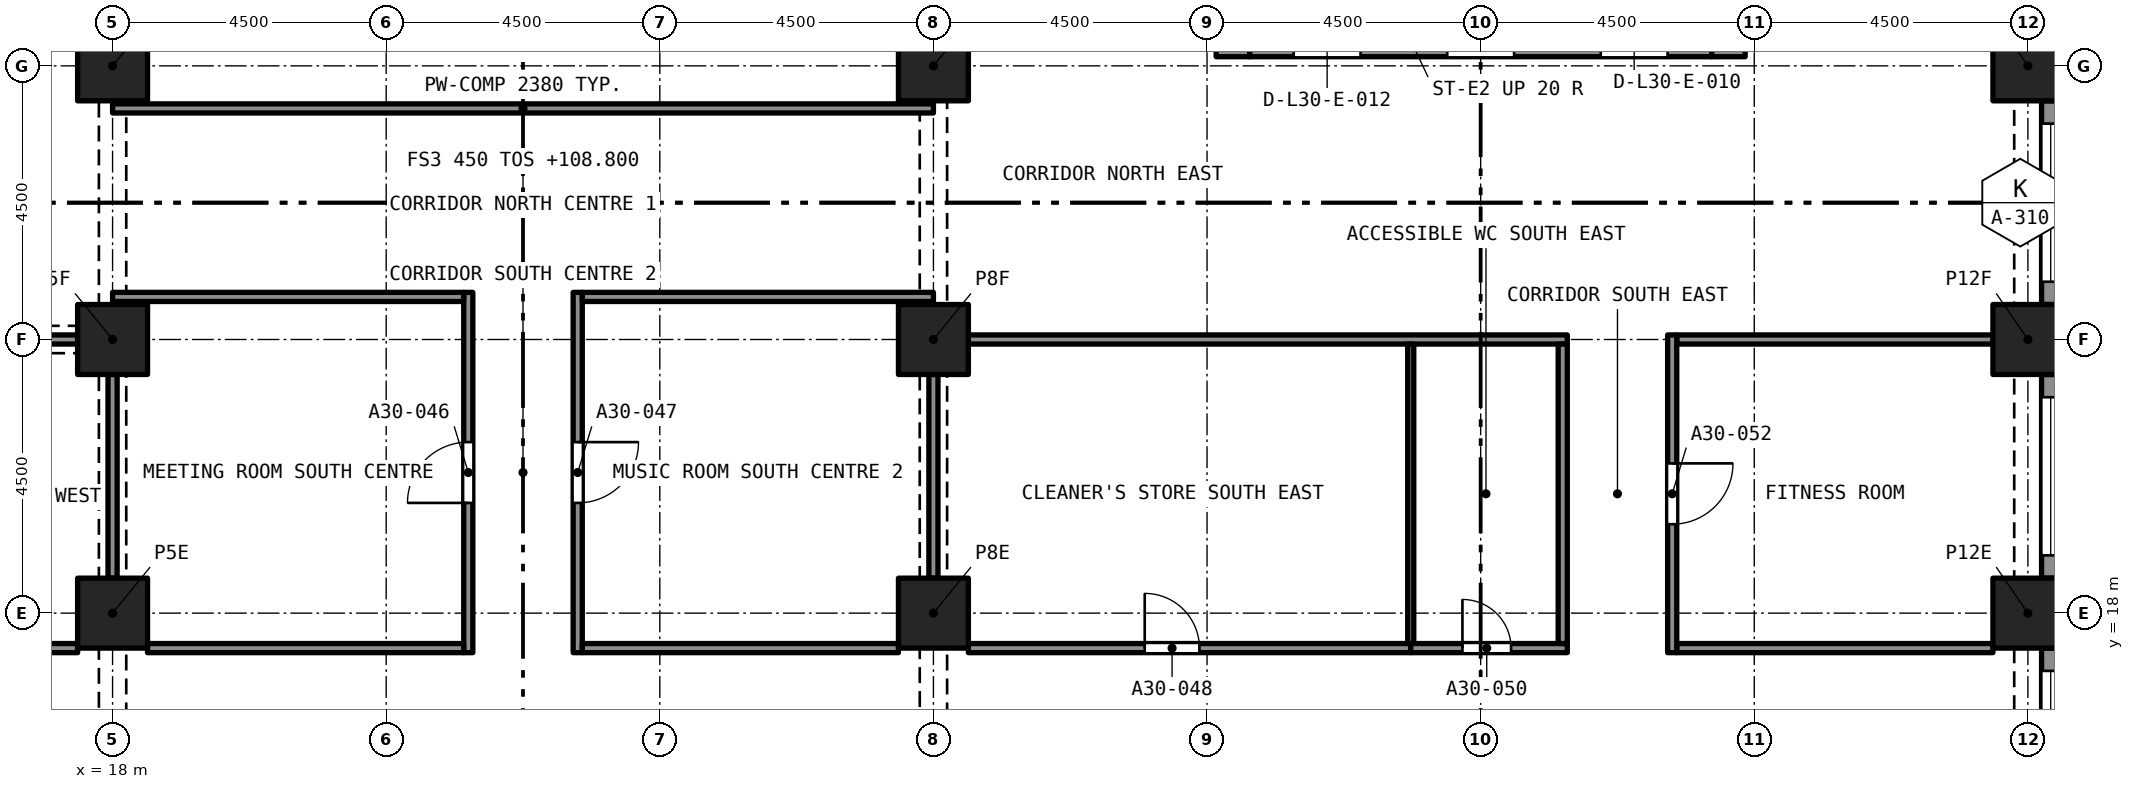
"""IFC4 building model, lengths in metres.
Left out: names, types, materials, properties, quantities, classifications, styles, units other than length and angle.
Written with IfcOpenShell. Run it as: python <this file> out.ifc"""

import sys

from ifc_helpers import new_model, si_unit, direction, frame, frame_2d, origin, origin_2d, place, context, subcontext, project, spatial, rectangle, extrude, element, fill, save


model = new_model("IFC4")
c1 = context("Model", 3, precision=1e-05, world=origin(), true_north=direction((0.0, 1.0)))
c2 = subcontext(c1, "Body", "Model", "MODEL_VIEW")
j1 = project(units=[si_unit("LENGTHUNIT", "METRE"), si_unit("PLANEANGLEUNIT", "RADIAN")], contexts=[c1])
p1 = place(None, origin())
s1 = spatial("IfcSite", under=j1, at=p1, CompositionType="ELEMENT")
p2 = place(p1, origin())
s2 = spatial("IfcBuilding", under=s1, at=p2, CompositionType="ELEMENT")
p3 = place(p2, frame((0.0, 0.0, 108.8)))
s3 = spatial("IfcBuildingStorey", under=s2, at=p3, CompositionType="ELEMENT", Elevation=108.8)
for number, where, z_axis, x_axis in (
    (1, (18.0, 18.0, 0.0), (0.0, 0.0, 1.0), (1.0, 0.0, 0.0)),
    (2, (31.5, 18.0, 0.0), (0.0, 0.0, 1.0), (1.0, 0.0, 0.0)),
    (3, (49.5, 18.0, 0.0), (0.0, 0.0, 1.0), (1.0, 0.0, 0.0)),
    (4, (18.0, 22.5, 0.0), (0.0, 0.0, 1.0), (1.0, 0.0, 0.0)),
    (5, (31.5, 22.5, 0.0), (0.0, 0.0, 1.0), (1.0, 0.0, 0.0)),
    (6, (49.5, 22.5, 0.0), (0.0, 0.0, 1.0), (1.0, 0.0, 0.0)),
    (7, (18.0, 27.0, 0.0), (0.0, 0.0, 1.0), (1.0, 0.0, 0.0)),
    (8, (31.5, 27.0, 0.0), (0.0, 0.0, 1.0), (1.0, 0.0, 0.0)),
    (9, (49.5, 27.0, 0.0), (0.0, 0.0, 1.0), (1.0, 0.0, 0.0)),
):
    element("IfcColumn", number, at=place(p3, frame(where, z_axis=z_axis, x_axis=x_axis)), inside=s3, PredefinedType="COLUMN", context=c2, shape_type="SweptSolid", body=[
        extrude(rectangle(XDim=1.15, YDim=1.15, at=origin_2d()), origin(), (0.0, 0.0, 1.0), 3.2),
    ])
p4 = place(p3, frame((36.7, 27.425, 0.0), z_axis=(0.0, 0.0, 1.0), x_axis=(1.0, 0.0, 0.0)))
e10 = element("IfcWall", 10, at=p4, inside=s3, PredefinedType="SOLIDWALL", context=c2, shape_type="SweptSolid", body=[
    extrude(rectangle(XDim=7.6, YDim=0.55, at=frame_2d((3.8, 0.0))), origin(), (0.0, 0.0, 1.0), 3.2),
])
p5 = place(p4, frame((5.775, 0.0, 0.0)))
e11 = element("IfcOpeningElement", 11, at=p5, cuts=e10, PredefinedType="OPENING", context=c2, shape_type="SweptSolid", body=[
    extrude(rectangle(XDim=1.1, YDim=2.1, at=frame_2d((0.55, 1.05))), frame((0.0, 0.285, 0.0), z_axis=(0.0, -1.0, 0.0), x_axis=(1.0, 0.0, 0.0)), (0.0, 0.0, 1.0), 0.57),
])
p6 = place(p4, frame((3.25, 0.0, 0.0)))
e12 = element("IfcOpeningElement", 12, at=p6, cuts=e10, PredefinedType="OPENING", context=c2, shape_type="SweptSolid", body=[
    extrude(rectangle(XDim=1.1, YDim=2.1, at=frame_2d((0.55, 1.05))), frame((0.0, 0.285, 0.0), z_axis=(0.0, -1.0, 0.0), x_axis=(1.0, 0.0, 0.0)), (0.0, 0.0, 1.0), 0.57),
])
p7 = place(p4, frame((0.725, 0.0, 0.0)))
e13 = element("IfcOpeningElement", 13, at=p7, cuts=e10, PredefinedType="OPENING", context=c2, shape_type="SweptSolid", body=[
    extrude(rectangle(XDim=1.1, YDim=2.1, at=frame_2d((0.55, 1.05))), frame((0.0, 0.285, 0.0), z_axis=(0.0, -1.0, 0.0), x_axis=(1.0, 0.0, 0.0)), (0.0, 0.0, 1.0), 0.57),
])
p8 = place(p3, frame((36.425, 27.15, 0.0), z_axis=(0.0, 0.0, 1.0), x_axis=(0.0, 1.0, 0.0)))
e14 = element("IfcWall", 14, at=p8, inside=s3, PredefinedType="SOLIDWALL", context=c2, shape_type="SweptSolid", body=[
    extrude(rectangle(XDim=13.2, YDim=0.55, at=frame_2d((6.6, 0.0))), origin(), (0.0, 0.0, 1.0), 3.2),
])
p9 = place(p8, frame((8.8, 0.0, 0.0)))
e15 = element("IfcOpeningElement", 15, at=p9, cuts=e14, PredefinedType="OPENING", context=c2, shape_type="SweptSolid", body=[
    extrude(rectangle(XDim=1.2, YDim=2.1, at=frame_2d((0.6, 1.05))), frame((0.0, 0.285, 0.0), z_axis=(0.0, -1.0, 0.0), x_axis=(1.0, 0.0, 0.0)), (0.0, 0.0, 1.0), 0.57),
])
p10 = place(p3, frame((44.575, 27.15, 0.0), z_axis=(0.0, 0.0, 1.0), x_axis=(0.0, 1.0, 0.0)))
e16 = element("IfcWall", 16, at=p10, inside=s3, PredefinedType="SOLIDWALL", context=c2, shape_type="SweptSolid", body=[
    extrude(rectangle(XDim=13.2, YDim=0.55, at=frame_2d((6.6, 0.0))), origin(), (0.0, 0.0, 1.0), 3.2),
])
p11 = place(p10, frame((8.8, 0.0, 0.0)))
e17 = element("IfcOpeningElement", 17, at=p11, cuts=e16, PredefinedType="OPENING", context=c2, shape_type="SweptSolid", body=[
    extrude(rectangle(XDim=1.2, YDim=2.1, at=frame_2d((0.6, 1.05))), frame((0.0, 0.285, 0.0), z_axis=(0.0, -1.0, 0.0), x_axis=(1.0, 0.0, 0.0)), (0.0, 0.0, 1.0), 0.57),
])
p12 = place(p3, frame((49.875, 17.425, 0.0), z_axis=(0.0, 0.0, 1.0), x_axis=(0.0, -1.0, 0.0)))
e18 = element("IfcWall", 18, at=p12, inside=s3, PredefinedType="SOLIDWALL", context=c2, shape_type="SweptSolid", body=[
    extrude(rectangle(XDim=3.35, YDim=0.3, at=frame_2d((1.675, 0.0))), origin(), (0.0, 0.0, 1.0), 3.2),
])
p13 = place(p12, frame((0.375, 0.0, 0.45)))
e19 = element("IfcOpeningElement", 19, at=p13, cuts=e18, PredefinedType="OPENING", context=c2, shape_type="SweptSolid", body=[
    extrude(rectangle(XDim=2.6, YDim=1.95, at=frame_2d((1.3, 0.975))), frame((0.0, 0.16, 0.0), z_axis=(0.0, -1.0, 0.0), x_axis=(1.0, 0.0, 0.0)), (0.0, 0.0, 1.0), 0.32),
])
p14 = place(p3, frame((49.875, 21.925, 0.0), z_axis=(0.0, 0.0, 1.0), x_axis=(0.0, -1.0, 0.0)))
e20 = element("IfcWall", 20, at=p14, inside=s3, PredefinedType="SOLIDWALL", context=c2, shape_type="SweptSolid", body=[
    extrude(rectangle(XDim=3.35, YDim=0.3, at=frame_2d((1.675, 0.0))), origin(), (0.0, 0.0, 1.0), 3.2),
])
p15 = place(p14, frame((0.375, 0.0, 0.45)))
e21 = element("IfcOpeningElement", 21, at=p15, cuts=e20, PredefinedType="OPENING", context=c2, shape_type="SweptSolid", body=[
    extrude(rectangle(XDim=2.6, YDim=1.95, at=frame_2d((1.3, 0.975))), frame((0.0, 0.16, 0.0), z_axis=(0.0, -1.0, 0.0), x_axis=(1.0, 0.0, 0.0)), (0.0, 0.0, 1.0), 0.32),
])
p16 = place(p3, frame((49.875, 26.425, 0.0), z_axis=(0.0, 0.0, 1.0), x_axis=(0.0, -1.0, 0.0)))
e22 = element("IfcWall", 22, at=p16, inside=s3, PredefinedType="SOLIDWALL", context=c2, shape_type="SweptSolid", body=[
    extrude(rectangle(XDim=3.35, YDim=0.3, at=frame_2d((1.675, 0.0))), origin(), (0.0, 0.0, 1.0), 3.2),
])
p17 = place(p16, frame((0.375, 0.0, 0.45)))
e23 = element("IfcOpeningElement", 23, at=p17, cuts=e22, PredefinedType="OPENING", context=c2, shape_type="SweptSolid", body=[
    extrude(rectangle(XDim=2.6, YDim=1.95, at=frame_2d((1.3, 0.975))), frame((0.0, 0.16, 0.0), z_axis=(0.0, -1.0, 0.0), x_axis=(1.0, 0.0, 0.0)), (0.0, 0.0, 1.0), 0.32),
])
p18 = place(p3, frame((23.85, 17.35, 0.0), z_axis=(0.0, 0.0, 1.0), x_axis=(0.0, 1.0, 0.0)))
e24 = element("IfcWall", 24, at=p18, inside=s3, PredefinedType="PARTITIONING", context=c2, shape_type="SweptSolid", body=[
    extrude(rectangle(XDim=5.925, YDim=0.15, at=frame_2d((2.962, 0.0))), origin(), (0.0, 0.0, 1.0), 2.75),
])
p19 = place(p18, frame((2.462, 0.0, 0.0)))
e25 = element("IfcOpeningElement", 25, at=p19, cuts=e24, PredefinedType="OPENING", context=c2, shape_type="SweptSolid", body=[
    extrude(rectangle(XDim=1.0, YDim=2.1, at=frame_2d((0.5, 1.05))), frame((0.0, 0.085, 0.0), z_axis=(0.0, -1.0, 0.0), x_axis=(1.0, 0.0, 0.0)), (0.0, 0.0, 1.0), 0.17),
])
p20 = place(p3, frame((25.65, 23.275, 0.0), z_axis=(0.0, 0.0, 1.0), x_axis=(0.0, -1.0, 0.0)))
e26 = element("IfcWall", 26, at=p20, inside=s3, PredefinedType="PARTITIONING", context=c2, shape_type="SweptSolid", body=[
    extrude(rectangle(XDim=5.925, YDim=0.15, at=frame_2d((2.962, 0.0))), origin(), (0.0, 0.0, 1.0), 2.75),
])
p21 = place(p20, frame((2.462, 0.0, 0.0)))
e27 = element("IfcOpeningElement", 27, at=p21, cuts=e26, PredefinedType="OPENING", context=c2, shape_type="SweptSolid", body=[
    extrude(rectangle(XDim=1.0, YDim=2.1, at=frame_2d((0.5, 1.05))), frame((0.0, 0.085, 0.0), z_axis=(0.0, -1.0, 0.0), x_axis=(1.0, 0.0, 0.0)), (0.0, 0.0, 1.0), 0.17),
])
for number, where, z_axis, x_axis in (
    (28, (18.575, 17.425, 0.0), (0.0, 0.0, 1.0), (1.0, 0.0, 0.0)),
    (29, (25.725, 17.425, 0.0), (0.0, 0.0, 1.0), (1.0, 0.0, 0.0)),
):
    element("IfcWall", number, at=place(p3, frame(where, z_axis=z_axis, x_axis=x_axis)), inside=s3, PredefinedType="PARTITIONING", context=c2, shape_type="SweptSolid", body=[
        extrude(rectangle(XDim=5.2, YDim=0.15, at=frame_2d((2.6, 0.0))), origin(), (0.0, 0.0, 1.0), 2.75),
    ])
p22 = place(p3, frame((32.075, 17.425, 0.0), z_axis=(0.0, 0.0, 1.0), x_axis=(1.0, 0.0, 0.0)))
e30 = element("IfcWall", 30, at=p22, inside=s3, PredefinedType="PARTITIONING", context=c2, shape_type="SweptSolid", body=[
    extrude(rectangle(XDim=7.275, YDim=0.15, at=frame_2d((3.638, 0.0))), origin(), (0.0, 0.0, 1.0), 2.9),
])
p23 = place(p22, frame((2.9, 0.0, 0.0)))
e31 = element("IfcOpeningElement", 31, at=p23, cuts=e30, PredefinedType="OPENING", context=c2, shape_type="SweptSolid", body=[
    extrude(rectangle(XDim=0.9, YDim=2.1, at=frame_2d((0.45, 1.05))), frame((0.0, 0.085, 0.0), z_axis=(0.0, -1.0, 0.0), x_axis=(1.0, 0.0, 0.0)), (0.0, 0.0, 1.0), 0.17),
])
p24 = place(p3, frame((10.15, 17.425, 0.0), z_axis=(0.0, 0.0, 1.0), x_axis=(1.0, 0.0, 0.0)))
e32 = element("IfcWall", 32, at=p24, inside=s3, PredefinedType="PARTITIONING", context=c2, shape_type="SweptSolid", body=[
    extrude(rectangle(XDim=7.275, YDim=0.15, at=frame_2d((3.638, 0.0))), origin(), (0.0, 0.0, 1.0), 2.9),
])
p25 = place(p24, frame((3.475, 0.0, 0.0)))
e33 = element("IfcOpeningElement", 33, at=p25, cuts=e32, PredefinedType="OPENING", context=c2, shape_type="SweptSolid", body=[
    extrude(rectangle(XDim=0.9, YDim=2.1, at=frame_2d((0.45, 1.05))), frame((0.0, 0.085, 0.0), z_axis=(0.0, -1.0, 0.0), x_axis=(1.0, 0.0, 0.0)), (0.0, 0.0, 1.0), 0.17),
])
p26 = place(p3, frame((39.35, 17.425, 0.0), z_axis=(0.0, 0.0, 1.0), x_axis=(1.0, 0.0, 0.0)))
e34 = element("IfcWall", 34, at=p26, inside=s3, PredefinedType="PARTITIONING", context=c2, shape_type="SweptSolid", body=[
    extrude(rectangle(XDim=2.575, YDim=0.15, at=frame_2d((1.288, 0.0))), origin(), (0.0, 0.0, 1.0), 2.9),
])
p27 = place(p26, frame((0.85, 0.0, 0.0)))
e35 = element("IfcOpeningElement", 35, at=p27, cuts=e34, PredefinedType="OPENING", context=c2, shape_type="SweptSolid", body=[
    extrude(rectangle(XDim=0.8, YDim=2.1, at=frame_2d((0.4, 1.05))), frame((0.0, 0.085, 0.0), z_axis=(0.0, -1.0, 0.0), x_axis=(1.0, 0.0, 0.0)), (0.0, 0.0, 1.0), 0.17),
])
p28 = place(p3, frame((43.725, 17.425, 0.0), z_axis=(0.0, 0.0, 1.0), x_axis=(1.0, 0.0, 0.0)))
e36 = element("IfcWall", 36, at=p28, inside=s3, PredefinedType="PARTITIONING", context=c2, shape_type="SweptSolid", body=[
    extrude(rectangle(XDim=5.2, YDim=0.15, at=frame_2d((2.6, 0.0))), origin(), (0.0, 0.0, 1.0), 2.9),
])
p29 = place(p3, frame((18.0, 26.3, 0.0), z_axis=(0.0, 0.0, 1.0), x_axis=(1.0, 0.0, 0.0)))
e37 = element("IfcWall", 37, at=p29, inside=s3, PredefinedType="PARTITIONING", context=c2, shape_type="SweptSolid", body=[
    extrude(rectangle(XDim=13.5, YDim=0.15, at=frame_2d((6.75, 0.0))), origin(), (0.0, 0.0, 1.0), 2.38),
])
p30 = place(p3, frame((18.0, 23.2, 0.0), z_axis=(0.0, 0.0, 1.0), x_axis=(1.0, 0.0, 0.0)))
e38 = element("IfcWall", 38, at=p30, inside=s3, PredefinedType="PARTITIONING", context=c2, shape_type="SweptSolid", body=[
    extrude(rectangle(XDim=5.775, YDim=0.15, at=frame_2d((2.887, 0.0))), origin(), (0.0, 0.0, 1.0), 2.75),
])
p31 = place(p3, frame((18.0, 18.575, 0.0), z_axis=(0.0, 0.0, 1.0), x_axis=(0.0, 1.0, 0.0)))
e39 = element("IfcWall", 39, at=p31, inside=s3, PredefinedType="PARTITIONING", context=c2, shape_type="SweptSolid", body=[
    extrude(rectangle(XDim=3.35, YDim=0.15, at=frame_2d((1.675, 0.0))), origin(), (0.0, 0.0, 1.0), 2.38),
])
p32 = place(p3, frame((25.725, 23.2, 0.0), z_axis=(0.0, 0.0, 1.0), x_axis=(1.0, 0.0, 0.0)))
e40 = element("IfcWall", 40, at=p32, inside=s3, PredefinedType="PARTITIONING", context=c2, shape_type="SweptSolid", body=[
    extrude(rectangle(XDim=5.775, YDim=0.15, at=frame_2d((2.887, 0.0))), origin(), (0.0, 0.0, 1.0), 2.75),
])
p33 = place(p3, frame((31.5, 18.575, 0.0), z_axis=(0.0, 0.0, 1.0), x_axis=(0.0, 1.0, 0.0)))
e41 = element("IfcWall", 41, at=p33, inside=s3, PredefinedType="PARTITIONING", context=c2, shape_type="SweptSolid", body=[
    extrude(rectangle(XDim=3.35, YDim=0.15, at=frame_2d((1.675, 0.0))), origin(), (0.0, 0.0, 1.0), 2.38),
])
p34 = place(p3, frame((32.075, 22.5, 0.0), z_axis=(0.0, 0.0, 1.0), x_axis=(1.0, 0.0, 0.0)))
e42 = element("IfcWall", 42, at=p34, inside=s3, PredefinedType="PARTITIONING", context=c2, shape_type="SweptSolid", body=[
    extrude(rectangle(XDim=9.85, YDim=0.15, at=frame_2d((4.925, 0.0))), origin(), (0.0, 0.0, 1.0), 2.9),
])
p35 = place(p3, frame((43.725, 22.5, 0.0), z_axis=(0.0, 0.0, 1.0), x_axis=(1.0, 0.0, 0.0)))
e43 = element("IfcWall", 43, at=p35, inside=s3, PredefinedType="PARTITIONING", context=c2, shape_type="SweptSolid", body=[
    extrude(rectangle(XDim=5.2, YDim=0.15, at=frame_2d((2.6, 0.0))), origin(), (0.0, 0.0, 1.0), 2.9),
])
p36 = place(p3, frame((14.075, 22.5, 0.0), z_axis=(0.0, 0.0, 1.0), x_axis=(1.0, 0.0, 0.0)))
e44 = element("IfcWall", 44, at=p36, inside=s3, PredefinedType="PARTITIONING", context=c2, shape_type="SweptSolid", body=[
    extrude(rectangle(XDim=3.35, YDim=0.15, at=frame_2d((1.675, 0.0))), origin(), (0.0, 0.0, 1.0), 2.38),
])
p37 = place(p3, frame((41.85, 17.5, 0.0), z_axis=(0.0, 0.0, 1.0), x_axis=(0.0, 1.0, 0.0)))
e45 = element("IfcWall", 45, at=p37, inside=s3, PredefinedType="PARTITIONING", context=c2, shape_type="SweptSolid", body=[
    extrude(rectangle(XDim=4.925, YDim=0.15, at=frame_2d((2.462, 0.0))), origin(), (0.0, 0.0, 1.0), 2.9),
])
p38 = place(p3, frame((43.65, 22.575, 0.0), z_axis=(0.0, 0.0, 1.0), x_axis=(0.0, -1.0, 0.0)))
e46 = element("IfcWall", 46, at=p38, inside=s3, PredefinedType="PARTITIONING", context=c2, shape_type="SweptSolid", body=[
    extrude(rectangle(XDim=5.225, YDim=0.15, at=frame_2d((2.612, 0.0))), origin(), (0.0, 0.0, 1.0), 2.9),
])
p39 = place(p38, frame((2.113, 0.0, 0.0)))
e47 = element("IfcOpeningElement", 47, at=p39, cuts=e46, PredefinedType="OPENING", context=c2, shape_type="SweptSolid", body=[
    extrude(rectangle(XDim=1.0, YDim=2.1, at=frame_2d((0.5, 1.05))), frame((0.0, 0.085, 0.0), z_axis=(0.0, -1.0, 0.0), x_axis=(1.0, 0.0, 0.0)), (0.0, 0.0, 1.0), 0.17),
])
p40 = place(p3, frame((39.35, 17.5, 0.0), z_axis=(0.0, 0.0, 1.0), x_axis=(0.0, 1.0, 0.0)))
e48 = element("IfcWall", 48, at=p40, inside=s3, PredefinedType="PARTITIONING", context=c2, shape_type="SweptSolid", body=[
    extrude(rectangle(XDim=4.925, YDim=0.1, at=frame_2d((2.462, 0.0))), origin(), (0.0, 0.0, 1.0), 2.9),
])
p41 = place(p13, origin())
e49 = element("IfcWindow", 49, at=p41, inside=s3, PartitioningType="SINGLE_PANEL", PredefinedType="WINDOW", context=c2, shape_type="SweptSolid", body=[
    extrude(rectangle(XDim=2.6, YDim=1.95, at=frame_2d((1.3, 0.975))), frame((0.0, 0.03, 0.0), z_axis=(0.0, -1.0, 0.0), x_axis=(1.0, 0.0, 0.0)), (0.0, 0.0, 1.0), 0.06),
])
fill(e19, e49)
p42 = place(p15, origin())
e50 = element("IfcWindow", 50, at=p42, inside=s3, PartitioningType="SINGLE_PANEL", PredefinedType="WINDOW", context=c2, shape_type="SweptSolid", body=[
    extrude(rectangle(XDim=2.6, YDim=1.95, at=frame_2d((1.3, 0.975))), frame((0.0, 0.03, 0.0), z_axis=(0.0, -1.0, 0.0), x_axis=(1.0, 0.0, 0.0)), (0.0, 0.0, 1.0), 0.06),
])
fill(e21, e50)
p43 = place(p17, origin())
e51 = element("IfcWindow", 51, at=p43, inside=s3, PartitioningType="SINGLE_PANEL", PredefinedType="WINDOW", context=c2, shape_type="SweptSolid", body=[
    extrude(rectangle(XDim=2.6, YDim=1.95, at=frame_2d((1.3, 0.975))), frame((0.0, 0.03, 0.0), z_axis=(0.0, -1.0, 0.0), x_axis=(1.0, 0.0, 0.0)), (0.0, 0.0, 1.0), 0.06),
])
fill(e23, e51)
p44 = place(p19, origin())
e52 = element("IfcDoor", 52, at=p44, inside=s3, OperationType="SINGLE_SWING_RIGHT", PredefinedType="DOOR", context=c2, shape_type="SweptSolid", body=[
    extrude(rectangle(XDim=1.0, YDim=2.1, at=frame_2d((0.5, 1.05))), frame((0.0, 0.025, 0.0), z_axis=(0.0, -1.0, 0.0), x_axis=(1.0, 0.0, 0.0)), (0.0, 0.0, 1.0), 0.05),
])
fill(e25, e52)
p45 = place(p21, origin())
e53 = element("IfcDoor", 53, at=p45, inside=s3, OperationType="SINGLE_SWING_RIGHT", PredefinedType="DOOR", context=c2, shape_type="SweptSolid", body=[
    extrude(rectangle(XDim=1.0, YDim=2.1, at=frame_2d((0.5, 1.05))), frame((0.0, 0.025, 0.0), z_axis=(0.0, -1.0, 0.0), x_axis=(1.0, 0.0, 0.0)), (0.0, 0.0, 1.0), 0.05),
])
fill(e27, e53)
p46 = place(p23, origin())
e54 = element("IfcDoor", 54, at=p46, inside=s3, OperationType="SINGLE_SWING_LEFT", PredefinedType="DOOR", context=c2, shape_type="SweptSolid", body=[
    extrude(rectangle(XDim=0.9, YDim=2.1, at=frame_2d((0.45, 1.05))), frame((0.0, 0.025, 0.0), z_axis=(0.0, -1.0, 0.0), x_axis=(1.0, 0.0, 0.0)), (0.0, 0.0, 1.0), 0.05),
])
fill(e31, e54)
p47 = place(p27, origin())
e55 = element("IfcDoor", 55, at=p47, inside=s3, OperationType="SINGLE_SWING_LEFT", PredefinedType="DOOR", context=c2, shape_type="SweptSolid", body=[
    extrude(rectangle(XDim=0.8, YDim=2.1, at=frame_2d((0.4, 1.05))), frame((0.0, 0.025, 0.0), z_axis=(0.0, -1.0, 0.0), x_axis=(1.0, 0.0, 0.0)), (0.0, 0.0, 1.0), 0.05),
])
fill(e35, e55)
p48 = place(p39, origin())
e56 = element("IfcDoor", 56, at=p48, inside=s3, OperationType="SINGLE_SWING_RIGHT", PredefinedType="DOOR", context=c2, shape_type="SweptSolid", body=[
    extrude(rectangle(XDim=1.0, YDim=2.1, at=frame_2d((0.5, 1.05))), frame((0.0, 0.025, 0.0), z_axis=(0.0, -1.0, 0.0), x_axis=(1.0, 0.0, 0.0)), (0.0, 0.0, 1.0), 0.05),
])
fill(e47, e56)
save(model, sys.argv[1])
